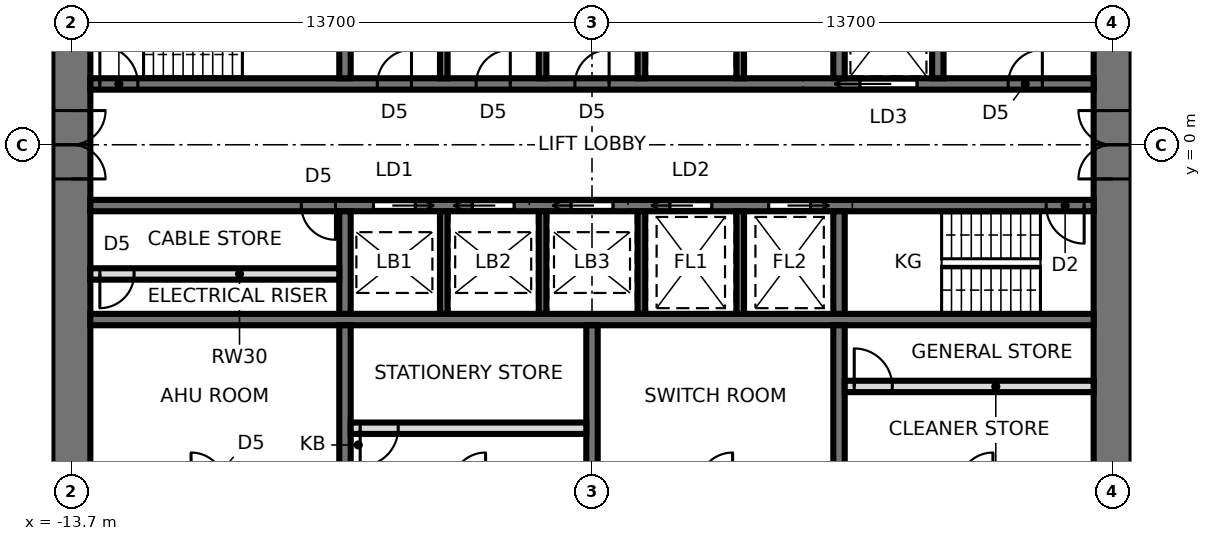
"""IFC4 building model, lengths in metres.
Left out: names, types, materials, properties, quantities, classifications, styles, units other than length and angle.
Written with IfcOpenShell. Run it as: python <this file> out.ifc"""

import sys

from ifc_helpers import new_model, si_unit, direction, frame, frame_2d, origin, place, context, subcontext, project, spatial, rectangle, extrude, element, fill, save


model = new_model("IFC4")
c1 = context("Model", 3, precision=1e-05, world=origin(), true_north=direction((0.0, 1.0)))
c2 = subcontext(c1, "Body", "Model", "MODEL_VIEW")
j1 = project(units=[si_unit("LENGTHUNIT", "METRE"), si_unit("PLANEANGLEUNIT", "RADIAN")], contexts=[c1])
p1 = place(None, origin())
s1 = spatial("IfcSite", under=j1, at=p1, CompositionType="ELEMENT")
p2 = place(p1, origin())
s2 = spatial("IfcBuilding", under=s1, at=p2, CompositionType="ELEMENT")
p3 = place(p2, frame((0.0, 0.0, 92.4)))
s3 = spatial("IfcBuildingStorey", under=s2, at=p3, CompositionType="ELEMENT", Elevation=92.4)
p4 = place(p3, frame((13.7, -9.5, 0.0), z_axis=(0.0, 0.0, 1.0), x_axis=(0.0, 1.0, 0.0)))
e1 = element("IfcWall", 1, at=p4, inside=s3, PredefinedType="SHEAR", context=c2, shape_type="SweptSolid", body=[
    extrude(rectangle(XDim=19.0, YDim=1.0, at=frame_2d((9.5, 0.0))), origin(), (0.0, 0.0, 1.0), 3.9),
])
p5 = place(p4, frame((8.6, 0.0, 0.0)))
e2 = element("IfcOpeningElement", 2, at=p5, cuts=e1, PredefinedType="OPENING", context=c2, shape_type="SweptSolid", body=[
    extrude(rectangle(XDim=1.8, YDim=2.4, at=frame_2d((0.9, 1.2))), frame((0.0, 0.51, 0.0), z_axis=(0.0, -1.0, 0.0), x_axis=(1.0, 0.0, 0.0)), (0.0, 0.0, 1.0), 1.02),
])
p6 = place(p3, frame((-13.7, 9.5, 0.0), z_axis=(0.0, 0.0, 1.0), x_axis=(0.0, -1.0, 0.0)))
e3 = element("IfcWall", 3, at=p6, inside=s3, PredefinedType="SHEAR", context=c2, shape_type="SweptSolid", body=[
    extrude(rectangle(XDim=19.0, YDim=1.0, at=frame_2d((9.5, 0.0))), origin(), (0.0, 0.0, 1.0), 3.9),
])
p7 = place(p6, frame((8.6, 0.0, 0.0)))
e4 = element("IfcOpeningElement", 4, at=p7, cuts=e3, PredefinedType="OPENING", context=c2, shape_type="SweptSolid", body=[
    extrude(rectangle(XDim=1.8, YDim=2.4, at=frame_2d((0.9, 1.2))), frame((0.0, 0.51, 0.0), z_axis=(0.0, -1.0, 0.0), x_axis=(1.0, 0.0, 0.0)), (0.0, 0.0, 1.0), 1.02),
])
p8 = place(p3, frame((-13.2, 1.6, 0.0), z_axis=(0.0, 0.0, 1.0), x_axis=(1.0, 0.0, 0.0)))
e5 = element("IfcWall", 5, at=p8, inside=s3, PredefinedType="SHEAR", context=c2, shape_type="SweptSolid", body=[
    extrude(rectangle(XDim=26.4, YDim=0.3, at=frame_2d((13.2, 0.0))), origin(), (0.0, 0.0, 1.0), 3.9),
])
p9 = place(p8, frame((0.25, 0.0, 0.0)))
e6 = element("IfcOpeningElement", 6, at=p9, cuts=e5, PredefinedType="OPENING", context=c2, shape_type="SweptSolid", body=[
    extrude(rectangle(XDim=1.0, YDim=2.1, at=frame_2d((0.5, 1.05))), frame((0.0, 0.16, 0.0), z_axis=(0.0, -1.0, 0.0), x_axis=(1.0, 0.0, 0.0)), (0.0, 0.0, 1.0), 0.32),
])
p10 = place(p8, frame((20.25, 0.0, 0.0)))
e7 = element("IfcOpeningElement", 7, at=p10, cuts=e5, PredefinedType="OPENING", context=c2, shape_type="SweptSolid", body=[
    extrude(rectangle(XDim=1.5, YDim=2.4, at=frame_2d((0.75, 1.2))), frame((0.0, 0.16, 0.0), z_axis=(0.0, -1.0, 0.0), x_axis=(1.0, 0.0, 0.0)), (0.0, 0.0, 1.0), 0.32),
])
p11 = place(p8, frame((7.55, 0.0, 0.0)))
e8 = element("IfcOpeningElement", 8, at=p11, cuts=e5, PredefinedType="OPENING", context=c2, shape_type="SweptSolid", body=[
    extrude(rectangle(XDim=0.9, YDim=2.1, at=frame_2d((0.45, 1.05))), frame((0.0, 0.16, 0.0), z_axis=(0.0, -1.0, 0.0), x_axis=(1.0, 0.0, 0.0)), (0.0, 0.0, 1.0), 0.32),
])
p12 = place(p8, frame((10.15, 0.0, 0.0)))
e9 = element("IfcOpeningElement", 9, at=p12, cuts=e5, PredefinedType="OPENING", context=c2, shape_type="SweptSolid", body=[
    extrude(rectangle(XDim=0.9, YDim=2.1, at=frame_2d((0.45, 1.05))), frame((0.0, 0.16, 0.0), z_axis=(0.0, -1.0, 0.0), x_axis=(1.0, 0.0, 0.0)), (0.0, 0.0, 1.0), 0.32),
])
p13 = place(p8, frame((12.75, 0.0, 0.0)))
e10 = element("IfcOpeningElement", 10, at=p13, cuts=e5, PredefinedType="OPENING", context=c2, shape_type="SweptSolid", body=[
    extrude(rectangle(XDim=0.9, YDim=2.1, at=frame_2d((0.45, 1.05))), frame((0.0, 0.16, 0.0), z_axis=(0.0, -1.0, 0.0), x_axis=(1.0, 0.0, 0.0)), (0.0, 0.0, 1.0), 0.32),
])
p14 = place(p8, frame((24.15, 0.0, 0.0)))
e11 = element("IfcOpeningElement", 11, at=p14, cuts=e5, PredefinedType="OPENING", context=c2, shape_type="SweptSolid", body=[
    extrude(rectangle(XDim=0.9, YDim=2.1, at=frame_2d((0.45, 1.05))), frame((0.0, 0.16, 0.0), z_axis=(0.0, -1.0, 0.0), x_axis=(1.0, 0.0, 0.0)), (0.0, 0.0, 1.0), 0.32),
])
p15 = place(p3, frame((-13.2, -1.6, 0.0), z_axis=(0.0, 0.0, 1.0), x_axis=(1.0, 0.0, 0.0)))
e12 = element("IfcWall", 12, at=p15, inside=s3, PredefinedType="SHEAR", context=c2, shape_type="SweptSolid", body=[
    extrude(rectangle(XDim=26.4, YDim=0.3, at=frame_2d((13.2, 0.0))), origin(), (0.0, 0.0, 1.0), 3.9),
])
p16 = place(p15, frame((25.15, 0.0, 0.0)))
e13 = element("IfcOpeningElement", 13, at=p16, cuts=e12, PredefinedType="OPENING", context=c2, shape_type="SweptSolid", body=[
    extrude(rectangle(XDim=1.0, YDim=2.1, at=frame_2d((0.5, 1.05))), frame((0.0, 0.16, 0.0), z_axis=(0.0, -1.0, 0.0), x_axis=(1.0, 0.0, 0.0)), (0.0, 0.0, 1.0), 0.32),
])
p17 = place(p15, frame((7.45, 0.0, 0.0)))
e14 = element("IfcOpeningElement", 14, at=p17, cuts=e12, PredefinedType="OPENING", context=c2, shape_type="SweptSolid", body=[
    extrude(rectangle(XDim=1.1, YDim=2.3, at=frame_2d((0.55, 1.15))), frame((0.0, 0.16, 0.0), z_axis=(0.0, -1.0, 0.0), x_axis=(1.0, 0.0, 0.0)), (0.0, 0.0, 1.0), 0.32),
])
p18 = place(p15, frame((10.05, 0.0, 0.0)))
e15 = element("IfcOpeningElement", 15, at=p18, cuts=e12, PredefinedType="OPENING", context=c2, shape_type="SweptSolid", body=[
    extrude(rectangle(XDim=1.1, YDim=2.3, at=frame_2d((0.55, 1.15))), frame((0.0, 0.16, 0.0), z_axis=(0.0, -1.0, 0.0), x_axis=(1.0, 0.0, 0.0)), (0.0, 0.0, 1.0), 0.32),
])
p19 = place(p15, frame((12.65, 0.0, 0.0)))
e16 = element("IfcOpeningElement", 16, at=p19, cuts=e12, PredefinedType="OPENING", context=c2, shape_type="SweptSolid", body=[
    extrude(rectangle(XDim=1.1, YDim=2.3, at=frame_2d((0.55, 1.15))), frame((0.0, 0.16, 0.0), z_axis=(0.0, -1.0, 0.0), x_axis=(1.0, 0.0, 0.0)), (0.0, 0.0, 1.0), 0.32),
])
p20 = place(p15, frame((15.25, 0.0, 0.0)))
e17 = element("IfcOpeningElement", 17, at=p20, cuts=e12, PredefinedType="OPENING", context=c2, shape_type="SweptSolid", body=[
    extrude(rectangle(XDim=1.1, YDim=2.3, at=frame_2d((0.55, 1.15))), frame((0.0, 0.16, 0.0), z_axis=(0.0, -1.0, 0.0), x_axis=(1.0, 0.0, 0.0)), (0.0, 0.0, 1.0), 0.32),
])
p21 = place(p15, frame((17.85, 0.0, 0.0)))
e18 = element("IfcOpeningElement", 18, at=p21, cuts=e12, PredefinedType="OPENING", context=c2, shape_type="SweptSolid", body=[
    extrude(rectangle(XDim=1.1, YDim=2.3, at=frame_2d((0.55, 1.15))), frame((0.0, 0.16, 0.0), z_axis=(0.0, -1.0, 0.0), x_axis=(1.0, 0.0, 0.0)), (0.0, 0.0, 1.0), 0.32),
])
p22 = place(p15, frame((5.55, 0.0, 0.0)))
e19 = element("IfcOpeningElement", 19, at=p22, cuts=e12, PredefinedType="OPENING", context=c2, shape_type="SweptSolid", body=[
    extrude(rectangle(XDim=0.9, YDim=2.1, at=frame_2d((0.45, 1.05))), frame((0.0, 0.16, 0.0), z_axis=(0.0, -1.0, 0.0), x_axis=(1.0, 0.0, 0.0)), (0.0, 0.0, 1.0), 0.32),
])
p23 = place(p3, frame((-13.2, -4.6, 0.0), z_axis=(0.0, 0.0, 1.0), x_axis=(1.0, 0.0, 0.0)))
e20 = element("IfcWall", 20, at=p23, inside=s3, PredefinedType="SHEAR", context=c2, shape_type="SweptSolid", body=[
    extrude(rectangle(XDim=26.4, YDim=0.3, at=frame_2d((13.2, 0.0))), origin(), (0.0, 0.0, 1.0), 3.9),
])
for number, where, z_axis, x_axis in (
    (21, (-6.5, 1.75, 0.0), (0.0, 0.0, 1.0), (0.0, 1.0, 0.0)),
    (22, (6.5, 1.75, 0.0), (0.0, 0.0, 1.0), (0.0, 1.0, 0.0)),
):
    element("IfcWall", number, at=place(p3, frame(where, z_axis=z_axis, x_axis=x_axis)), inside=s3, PredefinedType="SHEAR", context=c2, shape_type="SweptSolid", body=[
        extrude(rectangle(XDim=2.7, YDim=0.3, at=frame_2d((1.35, 0.0))), origin(), (0.0, 0.0, 1.0), 3.9),
    ])
for number, where, z_axis, x_axis in (
    (23, (-3.9, 1.75, 0.0), (0.0, 0.0, 1.0), (0.0, 1.0, 0.0)),
    (24, (-1.3, 1.75, 0.0), (0.0, 0.0, 1.0), (0.0, 1.0, 0.0)),
    (25, (1.3, 1.75, 0.0), (0.0, 0.0, 1.0), (0.0, 1.0, 0.0)),
    (26, (3.9, 1.75, 0.0), (0.0, 0.0, 1.0), (0.0, 1.0, 0.0)),
):
    element("IfcWall", number, at=place(p3, frame(where, z_axis=z_axis, x_axis=x_axis)), inside=s3, PredefinedType="SHEAR", context=c2, shape_type="SweptSolid", body=[
        extrude(rectangle(XDim=2.7, YDim=0.2, at=frame_2d((1.35, 0.0))), origin(), (0.0, 0.0, 1.0), 3.9),
    ])
p24 = place(p3, frame((-6.5, -1.75, 0.0), z_axis=(0.0, 0.0, 1.0), x_axis=(0.0, -1.0, 0.0)))
e27 = element("IfcWall", 27, at=p24, inside=s3, PredefinedType="SHEAR", context=c2, shape_type="SweptSolid", body=[
    extrude(rectangle(XDim=2.7, YDim=0.3, at=frame_2d((1.35, 0.0))), origin(), (0.0, 0.0, 1.0), 3.9),
])
p25 = place(p3, frame((-6.5, -4.75, 0.0), z_axis=(0.0, 0.0, 1.0), x_axis=(0.0, -1.0, 0.0)))
e28 = element("IfcWall", 28, at=p25, inside=s3, PredefinedType="SHEAR", context=c2, shape_type="SweptSolid", body=[
    extrude(rectangle(XDim=3.75, YDim=0.3, at=frame_2d((1.875, 0.0))), origin(), (0.0, 0.0, 1.0), 3.9),
])
p26 = place(p3, frame((6.5, -1.75, 0.0), z_axis=(0.0, 0.0, 1.0), x_axis=(0.0, -1.0, 0.0)))
e29 = element("IfcWall", 29, at=p26, inside=s3, PredefinedType="SHEAR", context=c2, shape_type="SweptSolid", body=[
    extrude(rectangle(XDim=2.7, YDim=0.3, at=frame_2d((1.35, 0.0))), origin(), (0.0, 0.0, 1.0), 3.9),
])
p27 = place(p3, frame((6.5, -4.75, 0.0), z_axis=(0.0, 0.0, 1.0), x_axis=(0.0, -1.0, 0.0)))
e30 = element("IfcWall", 30, at=p27, inside=s3, PredefinedType="SHEAR", context=c2, shape_type="SweptSolid", body=[
    extrude(rectangle(XDim=3.75, YDim=0.3, at=frame_2d((1.875, 0.0))), origin(), (0.0, 0.0, 1.0), 3.9),
])
for number, where, z_axis, x_axis in (
    (31, (-3.9, -1.75, 0.0), (0.0, 0.0, 1.0), (0.0, -1.0, 0.0)),
    (32, (-1.3, -1.75, 0.0), (0.0, 0.0, 1.0), (0.0, -1.0, 0.0)),
    (33, (1.3, -1.75, 0.0), (0.0, 0.0, 1.0), (0.0, -1.0, 0.0)),
    (34, (3.9, -1.75, 0.0), (0.0, 0.0, 1.0), (0.0, -1.0, 0.0)),
):
    element("IfcWall", number, at=place(p3, frame(where, z_axis=z_axis, x_axis=x_axis)), inside=s3, PredefinedType="SHEAR", context=c2, shape_type="SweptSolid", body=[
        extrude(rectangle(XDim=2.7, YDim=0.2, at=frame_2d((1.35, 0.0))), origin(), (0.0, 0.0, 1.0), 3.9),
    ])
p28 = place(p3, frame((0.0, -4.75, 0.0), z_axis=(0.0, 0.0, 1.0), x_axis=(0.0, -1.0, 0.0)))
e35 = element("IfcWall", 35, at=p28, inside=s3, PredefinedType="SHEAR", context=c2, shape_type="SweptSolid", body=[
    extrude(rectangle(XDim=3.75, YDim=0.3, at=frame_2d((1.875, 0.0))), origin(), (0.0, 0.0, 1.0), 3.9),
])
p29 = place(p3, frame((9.1, 1.75, 0.0), z_axis=(0.0, 0.0, 1.0), x_axis=(0.0, 1.0, 0.0)))
e36 = element("IfcWall", 36, at=p29, inside=s3, PredefinedType="SHEAR", context=c2, shape_type="SweptSolid", body=[
    extrude(rectangle(XDim=2.7, YDim=0.3, at=frame_2d((1.35, 0.0))), origin(), (0.0, 0.0, 1.0), 3.9),
])
p30 = place(p3, frame((-6.35, -7.46, 0.0), z_axis=(0.0, 0.0, 1.0), x_axis=(1.0, 0.0, 0.0)))
e37 = element("IfcWall", 37, at=p30, inside=s3, PredefinedType="PARTITIONING", context=c2, shape_type="SweptSolid", body=[
    extrude(rectangle(XDim=6.2, YDim=0.3, at=frame_2d((3.1, 0.0))), origin(), (0.0, 0.0, 1.0), 3.74),
])
p31 = place(p30, frame((0.25, 0.0, 0.0)))
e38 = element("IfcOpeningElement", 38, at=p31, cuts=e37, PredefinedType="OPENING", context=c2, shape_type="SweptSolid", body=[
    extrude(rectangle(XDim=1.0, YDim=2.4, at=frame_2d((0.5, 1.2))), frame((0.0, 0.16, 0.0), z_axis=(0.0, -1.0, 0.0), x_axis=(1.0, 0.0, 0.0)), (0.0, 0.0, 1.0), 0.32),
])
p32 = place(p3, frame((6.65, -6.36, 0.0), z_axis=(0.0, 0.0, 1.0), x_axis=(1.0, 0.0, 0.0)))
e39 = element("IfcWall", 39, at=p32, inside=s3, PredefinedType="PARTITIONING", context=c2, shape_type="SweptSolid", body=[
    extrude(rectangle(XDim=6.55, YDim=0.3, at=frame_2d((3.275, 0.0))), origin(), (0.0, 0.0, 1.0), 3.74),
])
p33 = place(p32, frame((0.25, 0.0, 0.0)))
e40 = element("IfcOpeningElement", 40, at=p33, cuts=e39, PredefinedType="OPENING", context=c2, shape_type="SweptSolid", body=[
    extrude(rectangle(XDim=1.0, YDim=2.4, at=frame_2d((0.5, 1.2))), frame((0.0, 0.16, 0.0), z_axis=(0.0, -1.0, 0.0), x_axis=(1.0, 0.0, 0.0)), (0.0, 0.0, 1.0), 0.32),
])
p34 = place(p3, frame((-13.2, -3.4, 0.0), z_axis=(0.0, 0.0, 1.0), x_axis=(1.0, 0.0, 0.0)))
e41 = element("IfcWall", 41, at=p34, inside=s3, PredefinedType="SOLIDWALL", context=c2, shape_type="SweptSolid", body=[
    extrude(rectangle(XDim=6.55, YDim=0.3, at=frame_2d((3.275, 0.0))), origin(), (0.0, 0.0, 1.0), 3.74),
])
p35 = place(p34, frame((0.25, 0.0, 0.0)))
e42 = element("IfcOpeningElement", 42, at=p35, cuts=e41, PredefinedType="OPENING", context=c2, shape_type="SweptSolid", body=[
    extrude(rectangle(XDim=0.9, YDim=2.1, at=frame_2d((0.45, 1.05))), frame((0.0, 0.16, 0.0), z_axis=(0.0, -1.0, 0.0), x_axis=(1.0, 0.0, 0.0)), (0.0, 0.0, 1.0), 0.32),
])
p36 = place(p7, origin())
e43 = element("IfcDoor", 43, at=p36, inside=s3, OperationType="DOUBLE_DOOR_SINGLE_SWING", PredefinedType="DOOR", context=c2, shape_type="SweptSolid", body=[
    extrude(rectangle(XDim=1.72, YDim=2.36, at=frame_2d((0.9, 1.18))), frame((0.0, 0.025, 0.0), z_axis=(0.0, -1.0, 0.0), x_axis=(1.0, 0.0, 0.0)), (0.0, 0.0, 1.0), 0.05),
    extrude(rectangle(XDim=0.04, YDim=2.4, at=frame_2d((0.02, 1.2))), frame((0.0, 0.25, 0.0), z_axis=(0.0, -1.0, 0.0), x_axis=(1.0, 0.0, 0.0)), (0.0, 0.0, 1.0), 0.5),
    extrude(rectangle(XDim=0.04, YDim=2.4, at=frame_2d((1.78, 1.2))), frame((0.0, 0.25, 0.0), z_axis=(0.0, -1.0, 0.0), x_axis=(1.0, 0.0, 0.0)), (0.0, 0.0, 1.0), 0.5),
    extrude(rectangle(XDim=1.72, YDim=0.04, at=frame_2d((0.9, 2.38))), frame((0.0, 0.25, 0.0), z_axis=(0.0, -1.0, 0.0), x_axis=(1.0, 0.0, 0.0)), (0.0, 0.0, 1.0), 0.5),
])
fill(e4, e43)
p37 = place(p5, origin())
e44 = element("IfcDoor", 44, at=p37, inside=s3, OperationType="DOUBLE_DOOR_SINGLE_SWING", PredefinedType="DOOR", context=c2, shape_type="SweptSolid", body=[
    extrude(rectangle(XDim=1.72, YDim=2.36, at=frame_2d((0.9, 1.18))), frame((0.0, 0.025, 0.0), z_axis=(0.0, -1.0, 0.0), x_axis=(1.0, 0.0, 0.0)), (0.0, 0.0, 1.0), 0.05),
    extrude(rectangle(XDim=0.04, YDim=2.4, at=frame_2d((0.02, 1.2))), frame((0.0, 0.25, 0.0), z_axis=(0.0, -1.0, 0.0), x_axis=(1.0, 0.0, 0.0)), (0.0, 0.0, 1.0), 0.5),
    extrude(rectangle(XDim=0.04, YDim=2.4, at=frame_2d((1.78, 1.2))), frame((0.0, 0.25, 0.0), z_axis=(0.0, -1.0, 0.0), x_axis=(1.0, 0.0, 0.0)), (0.0, 0.0, 1.0), 0.5),
    extrude(rectangle(XDim=1.72, YDim=0.04, at=frame_2d((0.9, 2.38))), frame((0.0, 0.25, 0.0), z_axis=(0.0, -1.0, 0.0), x_axis=(1.0, 0.0, 0.0)), (0.0, 0.0, 1.0), 0.5),
])
fill(e2, e44)
p38 = place(p9, origin())
e45 = element("IfcDoor", 45, at=p38, inside=s3, OperationType="SINGLE_SWING_LEFT", PredefinedType="DOOR", context=c2, shape_type="SweptSolid", body=[
    extrude(rectangle(XDim=1.0, YDim=2.1, at=frame_2d((0.5, 1.05))), frame((0.0, 0.025, 0.0), z_axis=(0.0, -1.0, 0.0), x_axis=(1.0, 0.0, 0.0)), (0.0, 0.0, 1.0), 0.05),
])
fill(e6, e45)
p39 = place(p16, frame((1.0, 0.0, 0.0), z_axis=(0.0, 0.0, 1.0), x_axis=(-1.0, 0.0, 0.0)))
e46 = element("IfcDoor", 46, at=p39, inside=s3, OperationType="SINGLE_SWING_LEFT", PredefinedType="DOOR", context=c2, shape_type="SweptSolid", body=[
    extrude(rectangle(XDim=1.0, YDim=2.1, at=frame_2d((0.5, 1.05))), frame((0.0, 0.025, 0.0), z_axis=(0.0, -1.0, 0.0), x_axis=(1.0, 0.0, 0.0)), (0.0, 0.0, 1.0), 0.05),
])
fill(e13, e46)
p40 = place(p10, origin())
e47 = element("IfcDoor", 47, at=p40, inside=s3, OperationType="SLIDING_TO_LEFT", PredefinedType="DOOR", context=c2, shape_type="SweptSolid", body=[
    extrude(rectangle(XDim=1.5, YDim=2.4, at=frame_2d((0.75, 1.2))), frame((0.0, 0.025, 0.0), z_axis=(0.0, -1.0, 0.0), x_axis=(1.0, 0.0, 0.0)), (0.0, 0.0, 1.0), 0.05),
])
fill(e7, e47)
p41 = place(p11, origin())
e48 = element("IfcDoor", 48, at=p41, inside=s3, OperationType="SINGLE_SWING_RIGHT", PredefinedType="DOOR", context=c2, shape_type="SweptSolid", body=[
    extrude(rectangle(XDim=0.9, YDim=2.1, at=frame_2d((0.45, 1.05))), frame((0.0, 0.025, 0.0), z_axis=(0.0, -1.0, 0.0), x_axis=(1.0, 0.0, 0.0)), (0.0, 0.0, 1.0), 0.05),
])
fill(e8, e48)
p42 = place(p12, origin())
e49 = element("IfcDoor", 49, at=p42, inside=s3, OperationType="SINGLE_SWING_RIGHT", PredefinedType="DOOR", context=c2, shape_type="SweptSolid", body=[
    extrude(rectangle(XDim=0.9, YDim=2.1, at=frame_2d((0.45, 1.05))), frame((0.0, 0.025, 0.0), z_axis=(0.0, -1.0, 0.0), x_axis=(1.0, 0.0, 0.0)), (0.0, 0.0, 1.0), 0.05),
])
fill(e9, e49)
p43 = place(p13, origin())
e50 = element("IfcDoor", 50, at=p43, inside=s3, OperationType="SINGLE_SWING_RIGHT", PredefinedType="DOOR", context=c2, shape_type="SweptSolid", body=[
    extrude(rectangle(XDim=0.9, YDim=2.1, at=frame_2d((0.45, 1.05))), frame((0.0, 0.025, 0.0), z_axis=(0.0, -1.0, 0.0), x_axis=(1.0, 0.0, 0.0)), (0.0, 0.0, 1.0), 0.05),
])
fill(e10, e50)
p44 = place(p17, frame((1.1, 0.0, 0.0), z_axis=(0.0, 0.0, 1.0), x_axis=(-1.0, 0.0, 0.0)))
e51 = element("IfcDoor", 51, at=p44, inside=s3, OperationType="SLIDING_TO_LEFT", PredefinedType="DOOR", context=c2, shape_type="SweptSolid", body=[
    extrude(rectangle(XDim=1.1, YDim=2.3, at=frame_2d((0.55, 1.15))), frame((0.0, 0.025, 0.0), z_axis=(0.0, -1.0, 0.0), x_axis=(1.0, 0.0, 0.0)), (0.0, 0.0, 1.0), 0.05),
])
fill(e14, e51)
p45 = place(p18, frame((1.1, 0.0, 0.0), z_axis=(0.0, 0.0, 1.0), x_axis=(-1.0, 0.0, 0.0)))
e52 = element("IfcDoor", 52, at=p45, inside=s3, OperationType="SLIDING_TO_RIGHT", PredefinedType="DOOR", context=c2, shape_type="SweptSolid", body=[
    extrude(rectangle(XDim=1.1, YDim=2.3, at=frame_2d((0.55, 1.15))), frame((0.0, 0.025, 0.0), z_axis=(0.0, -1.0, 0.0), x_axis=(1.0, 0.0, 0.0)), (0.0, 0.0, 1.0), 0.05),
])
fill(e15, e52)
p46 = place(p19, frame((1.1, 0.0, 0.0), z_axis=(0.0, 0.0, 1.0), x_axis=(-1.0, 0.0, 0.0)))
e53 = element("IfcDoor", 53, at=p46, inside=s3, OperationType="SLIDING_TO_RIGHT", PredefinedType="DOOR", context=c2, shape_type="SweptSolid", body=[
    extrude(rectangle(XDim=1.1, YDim=2.3, at=frame_2d((0.55, 1.15))), frame((0.0, 0.025, 0.0), z_axis=(0.0, -1.0, 0.0), x_axis=(1.0, 0.0, 0.0)), (0.0, 0.0, 1.0), 0.05),
])
fill(e16, e53)
p47 = place(p20, frame((1.1, 0.0, 0.0), z_axis=(0.0, 0.0, 1.0), x_axis=(-1.0, 0.0, 0.0)))
e54 = element("IfcDoor", 54, at=p47, inside=s3, OperationType="SLIDING_TO_RIGHT", PredefinedType="DOOR", context=c2, shape_type="SweptSolid", body=[
    extrude(rectangle(XDim=1.1, YDim=2.3, at=frame_2d((0.55, 1.15))), frame((0.0, 0.025, 0.0), z_axis=(0.0, -1.0, 0.0), x_axis=(1.0, 0.0, 0.0)), (0.0, 0.0, 1.0), 0.05),
])
fill(e17, e54)
p48 = place(p21, frame((1.1, 0.0, 0.0), z_axis=(0.0, 0.0, 1.0), x_axis=(-1.0, 0.0, 0.0)))
e55 = element("IfcDoor", 55, at=p48, inside=s3, OperationType="SLIDING_TO_LEFT", PredefinedType="DOOR", context=c2, shape_type="SweptSolid", body=[
    extrude(rectangle(XDim=1.1, YDim=2.3, at=frame_2d((0.55, 1.15))), frame((0.0, 0.025, 0.0), z_axis=(0.0, -1.0, 0.0), x_axis=(1.0, 0.0, 0.0)), (0.0, 0.0, 1.0), 0.05),
])
fill(e18, e55)
p49 = place(p14, origin())
e56 = element("IfcDoor", 56, at=p49, inside=s3, OperationType="SINGLE_SWING_RIGHT", PredefinedType="DOOR", context=c2, shape_type="SweptSolid", body=[
    extrude(rectangle(XDim=0.9, YDim=2.1, at=frame_2d((0.45, 1.05))), frame((0.0, 0.025, 0.0), z_axis=(0.0, -1.0, 0.0), x_axis=(1.0, 0.0, 0.0)), (0.0, 0.0, 1.0), 0.05),
])
fill(e11, e56)
p50 = place(p22, frame((0.9, 0.0, 0.0), z_axis=(0.0, 0.0, 1.0), x_axis=(-1.0, 0.0, 0.0)))
e57 = element("IfcDoor", 57, at=p50, inside=s3, OperationType="SINGLE_SWING_LEFT", PredefinedType="DOOR", context=c2, shape_type="SweptSolid", body=[
    extrude(rectangle(XDim=0.9, YDim=2.1, at=frame_2d((0.45, 1.05))), frame((0.0, 0.025, 0.0), z_axis=(0.0, -1.0, 0.0), x_axis=(1.0, 0.0, 0.0)), (0.0, 0.0, 1.0), 0.05),
])
fill(e19, e57)
p51 = place(p31, frame((1.0, 0.0, 0.0), z_axis=(0.0, 0.0, 1.0), x_axis=(-1.0, 0.0, 0.0)))
e58 = element("IfcDoor", 58, at=p51, inside=s3, OperationType="SINGLE_SWING_RIGHT", PredefinedType="DOOR", context=c2, shape_type="SweptSolid", body=[
    extrude(rectangle(XDim=1.0, YDim=2.4, at=frame_2d((0.5, 1.2))), frame((0.0, 0.025, 0.0), z_axis=(0.0, -1.0, 0.0), x_axis=(1.0, 0.0, 0.0)), (0.0, 0.0, 1.0), 0.05),
])
fill(e38, e58)
p52 = place(p33, origin())
e59 = element("IfcDoor", 59, at=p52, inside=s3, OperationType="SINGLE_SWING_LEFT", PredefinedType="DOOR", context=c2, shape_type="SweptSolid", body=[
    extrude(rectangle(XDim=1.0, YDim=2.4, at=frame_2d((0.5, 1.2))), frame((0.0, 0.025, 0.0), z_axis=(0.0, -1.0, 0.0), x_axis=(1.0, 0.0, 0.0)), (0.0, 0.0, 1.0), 0.05),
])
fill(e40, e59)
p53 = place(p35, frame((0.9, 0.0, 0.0), z_axis=(0.0, 0.0, 1.0), x_axis=(-1.0, 0.0, 0.0)))
e60 = element("IfcDoor", 60, at=p53, inside=s3, OperationType="SINGLE_SWING_RIGHT", PredefinedType="DOOR", context=c2, shape_type="SweptSolid", body=[
    extrude(rectangle(XDim=0.9, YDim=2.1, at=frame_2d((0.45, 1.05))), frame((0.0, 0.025, 0.0), z_axis=(0.0, -1.0, 0.0), x_axis=(1.0, 0.0, 0.0)), (0.0, 0.0, 1.0), 0.05),
])
fill(e42, e60)
save(model, sys.argv[1])
